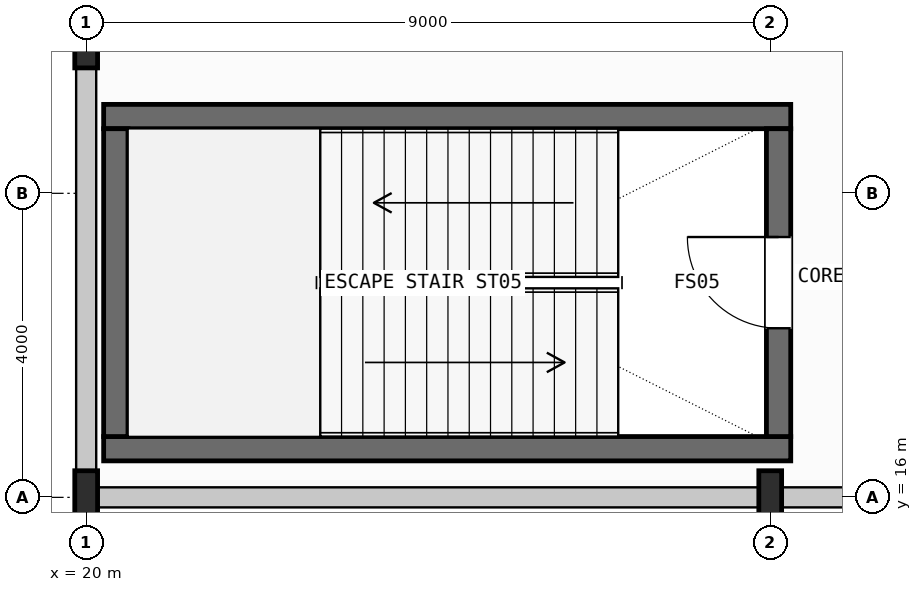
"""IFC4 building model, lengths in metres.
Left out: names, types, materials, properties, quantities, classifications, styles, units other than length and angle.
Written with IfcOpenShell. Run it as: python <this file> out.ifc"""

import sys

from ifc_helpers import new_model, si_unit, direction, frame, frame_2d, origin, origin_2d, place, context, subcontext, project, spatial, rectangle, i_section, extrude, element, fill, save


model = new_model("IFC4")
c1 = context("Model", 3, precision=1e-05, world=origin(), true_north=direction((0.0, 1.0)))
c2 = subcontext(c1, "Body", "Model", "MODEL_VIEW")
j1 = project(units=[si_unit("LENGTHUNIT", "METRE"), si_unit("PLANEANGLEUNIT", "RADIAN")], contexts=[c1])
p1 = place(None, origin())
s1 = spatial("IfcSite", under=j1, at=p1, CompositionType="ELEMENT")
p2 = place(p1, origin())
s2 = spatial("IfcBuilding", under=s1, at=p2, CompositionType="ELEMENT")
p3 = place(p2, frame((0.0, 0.0, 11.4)))
s3 = spatial("IfcBuildingStorey", under=s2, at=p3, CompositionType="ELEMENT", Elevation=11.4)
for number, where, z_axis, x_axis in (
    (1, (20.0, 16.0, 0.0), (0.0, 0.0, 1.0), (1.0, 0.0, 0.0)),
    (2, (20.0, 22.0, 0.0), (0.0, 0.0, 1.0), (1.0, 0.0, 0.0)),
    (3, (29.0, 16.0, 0.0), (0.0, 0.0, 1.0), (1.0, 0.0, 0.0)),
):
    element("IfcColumn", number, at=place(p3, frame(where, z_axis=z_axis, x_axis=x_axis)), inside=s3, PredefinedType="COLUMN", context=c2, shape_type="SweptSolid", body=[
        extrude(i_section(OverallWidth=0.3, OverallDepth=0.7, WebThickness=0.017, FlangeThickness=0.032, FilletRadius=0.027, at=origin_2d()), origin(), (0.0, 0.0, 1.0), 5.4),
    ])
for number, where, z_axis, x_axis in (
    (4, (20.23, 16.64, 0.0), (0.0, 0.0, 1.0), (1.0, 0.0, 0.0)),
    (5, (20.23, 21.01, 0.0), (0.0, 0.0, 1.0), (1.0, 0.0, 0.0)),
):
    element("IfcWall", number, at=place(p3, frame(where, z_axis=z_axis, x_axis=x_axis)), inside=s3, PredefinedType="SHEAR", context=c2, shape_type="SweptSolid", body=[
        extrude(rectangle(XDim=9.04, YDim=0.32, at=frame_2d((4.52, 0.0))), origin(), (0.0, 0.0, 1.0), 5.4),
    ])
p4 = place(p3, frame((20.39, 16.8, 0.0), z_axis=(0.0, 0.0, 1.0), x_axis=(0.0, 1.0, 0.0)))
e6 = element("IfcWall", 6, at=p4, inside=s3, PredefinedType="SHEAR", context=c2, shape_type="SweptSolid", body=[
    extrude(rectangle(XDim=4.05, YDim=0.32, at=frame_2d((2.025, 0.0))), origin(), (0.0, 0.0, 1.0), 5.4),
])
p5 = place(p3, frame((29.11, 16.8, 0.0), z_axis=(0.0, 0.0, 1.0), x_axis=(0.0, 1.0, 0.0)))
e7 = element("IfcWall", 7, at=p5, inside=s3, PredefinedType="SHEAR", context=c2, shape_type="SweptSolid", body=[
    extrude(rectangle(XDim=4.05, YDim=0.32, at=frame_2d((2.025, 0.0))), origin(), (0.0, 0.0, 1.0), 5.4),
])
p6 = place(p5, frame((1.425, 0.0, 0.0)))
e8 = element("IfcOpeningElement", 8, at=p6, cuts=e7, PredefinedType="OPENING", context=c2, shape_type="SweptSolid", body=[
    extrude(rectangle(XDim=1.2, YDim=2.2, at=frame_2d((0.6, 1.1))), frame((0.0, 0.17, 0.0), z_axis=(0.0, -1.0, 0.0), x_axis=(1.0, 0.0, 0.0)), (0.0, 0.0, 1.0), 0.34),
])
for number, where, z_axis, x_axis in (
    (9, (20.146, 16.0, 0.0), (0.0, 0.0, 1.0), (1.0, 0.0, 0.0)),
    (10, (29.146, 16.0, 0.0), (0.0, 0.0, 1.0), (1.0, 0.0, 0.0)),
):
    element("IfcWall", number, at=place(p3, frame(where, z_axis=z_axis, x_axis=x_axis)), inside=s3, PredefinedType="STANDARD", context=c2, shape_type="SweptSolid", body=[
        extrude(rectangle(XDim=8.708, YDim=0.264, at=frame_2d((4.354, 0.0))), origin(), (0.0, 0.0, 1.0), 4.438),
    ])
p7 = place(p3, frame((20.0, 16.346, 0.0), z_axis=(0.0, 0.0, 1.0), x_axis=(0.0, 1.0, 0.0)))
e11 = element("IfcWall", 11, at=p7, inside=s3, PredefinedType="STANDARD", context=c2, shape_type="SweptSolid", body=[
    extrude(rectangle(XDim=5.308, YDim=0.264, at=frame_2d((2.654, 0.0))), origin(), (0.0, 0.0, 1.0), 4.538),
])
p8 = place(p6, origin())
e12 = element("IfcDoor", 12, at=p8, inside=s3, OperationType="SINGLE_SWING_RIGHT", PredefinedType="DOOR", context=c2, shape_type="SweptSolid", body=[
    extrude(rectangle(XDim=1.2, YDim=2.2, at=frame_2d((0.6, 1.1))), frame((0.0, 0.025, 0.0), z_axis=(0.0, -1.0, 0.0), x_axis=(1.0, 0.0, 0.0)), (0.0, 0.0, 1.0), 0.05),
])
fill(e8, e12)
save(model, sys.argv[1])
